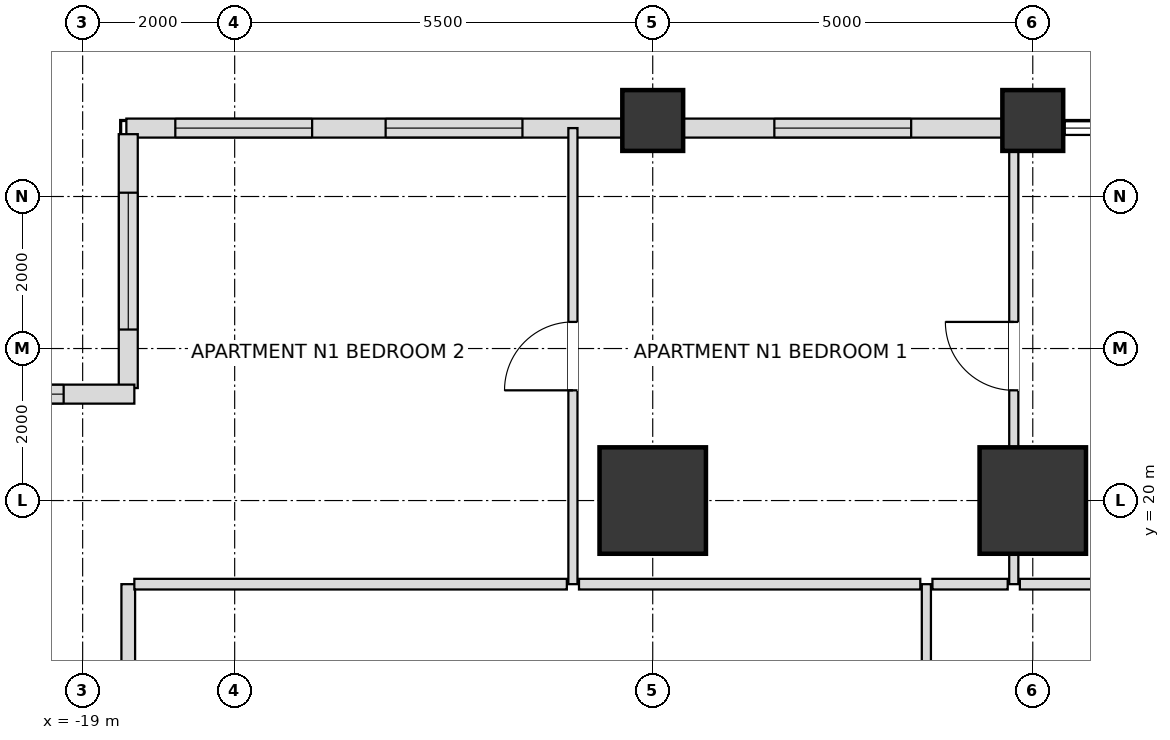
"""IFC4 building model, lengths in metres.
Left out: names, types, materials, properties, quantities, classifications, styles, units other than length and angle.
Written with IfcOpenShell. Run it as: python <this file> out.ifc"""

import sys

from ifc_helpers import new_model, si_unit, direction, frame, frame_2d, origin, origin_2d, place, context, subcontext, project, spatial, rectangle, extrude, element, fill, save


model = new_model("IFC4")
c1 = context("Model", 3, precision=1e-05, world=origin(), true_north=direction((0.0, 1.0)))
c2 = subcontext(c1, "Body", "Model", "MODEL_VIEW")
j1 = project(units=[si_unit("LENGTHUNIT", "METRE"), si_unit("PLANEANGLEUNIT", "RADIAN")], contexts=[c1])
p1 = place(None, origin())
s1 = spatial("IfcSite", under=j1, at=p1, CompositionType="ELEMENT")
p2 = place(p1, origin())
s2 = spatial("IfcBuilding", under=s1, at=p2, CompositionType="ELEMENT")
p3 = place(p2, frame((0.0, 0.0, 32.4)))
s3 = spatial("IfcBuildingStorey", under=s2, at=p3, CompositionType="ELEMENT", Elevation=32.4)
for number, where, z_axis, x_axis in (
    (1, (-6.5, 20.0, 0.0), (0.0, 0.0, 1.0), (1.0, 0.0, 0.0)),
    (2, (-11.5, 20.0, 0.0), (0.0, 0.0, 1.0), (1.0, 0.0, 0.0)),
):
    element("IfcColumn", number, at=place(p3, frame(where, z_axis=z_axis, x_axis=x_axis)), inside=s3, PredefinedType="USERDEFINED", context=c2, shape_type="SweptSolid", body=[
        extrude(rectangle(XDim=1.4, YDim=1.4, at=origin_2d()), origin(), (0.0, 0.0, 1.0), 3.6),
    ])
for number, where, z_axis, x_axis in (
    (3, (-11.5, 25.0, 0.0), (0.0, 0.0, 1.0), (1.0, 0.0, 0.0)),
    (4, (-6.5, 25.0, 0.0), (0.0, 0.0, 1.0), (1.0, 0.0, 0.0)),
):
    element("IfcColumn", number, at=place(p3, frame(where, z_axis=z_axis, x_axis=x_axis)), inside=s3, PredefinedType="COLUMN", context=c2, shape_type="SweptSolid", body=[
        extrude(rectangle(XDim=0.8, YDim=0.8, at=origin_2d()), origin(), (0.0, 0.0, 1.0), 3.6),
    ])
p4 = place(p3, frame((-6.895, 24.9, 0.0), z_axis=(0.0, 0.0, 1.0), x_axis=(-1.0, 0.0, 0.0)))
e5 = element("IfcWall", 5, at=p4, inside=s3, PredefinedType="SOLIDWALL", context=c2, shape_type="SweptSolid", body=[
    extrude(rectangle(XDim=4.21, YDim=0.25, at=frame_2d((2.105, 0.0))), origin(), (0.0, 0.0, 1.0), 2.736),
])
p5 = place(p4, frame((1.205, 0.0, 0.72)))
e6 = element("IfcOpeningElement", 6, at=p5, cuts=e5, PredefinedType="OPENING", context=c2, shape_type="SweptSolid", body=[
    extrude(rectangle(XDim=1.8, YDim=1.68, at=frame_2d((0.9, 0.84))), frame((0.0, 0.135, 0.0), z_axis=(0.0, -1.0, 0.0), x_axis=(1.0, 0.0, 0.0)), (0.0, 0.0, 1.0), 0.27),
])
p6 = place(p3, frame((-11.895, 24.9, 0.0), z_axis=(0.0, 0.0, 1.0), x_axis=(-1.0, 0.0, 0.0)))
e7 = element("IfcWall", 7, at=p6, inside=s3, PredefinedType="SOLIDWALL", context=c2, shape_type="SweptSolid", body=[
    extrude(rectangle(XDim=6.53, YDim=0.25, at=frame_2d((3.265, 0.0))), origin(), (0.0, 0.0, 1.0), 2.736),
])
p7 = place(p6, frame((1.319, 0.0, 0.72)))
e8 = element("IfcOpeningElement", 8, at=p7, cuts=e7, PredefinedType="OPENING", context=c2, shape_type="SweptSolid", body=[
    extrude(rectangle(XDim=1.8, YDim=1.68, at=frame_2d((0.9, 0.84))), frame((0.0, 0.135, 0.0), z_axis=(0.0, -1.0, 0.0), x_axis=(1.0, 0.0, 0.0)), (0.0, 0.0, 1.0), 0.27),
])
p8 = place(p6, frame((4.086, 0.0, 0.72)))
e9 = element("IfcOpeningElement", 9, at=p8, cuts=e7, PredefinedType="OPENING", context=c2, shape_type="SweptSolid", body=[
    extrude(rectangle(XDim=1.8, YDim=1.68, at=frame_2d((0.9, 0.84))), frame((0.0, 0.135, 0.0), z_axis=(0.0, -1.0, 0.0), x_axis=(1.0, 0.0, 0.0)), (0.0, 0.0, 1.0), 0.27),
])
p9 = place(p3, frame((-18.4, 24.82, 0.0), z_axis=(0.0, 0.0, 1.0), x_axis=(0.0, -1.0, 0.0)))
e10 = element("IfcWall", 10, at=p9, inside=s3, PredefinedType="SOLIDWALL", context=c2, shape_type="SweptSolid", body=[
    extrude(rectangle(XDim=3.34, YDim=0.25, at=frame_2d((1.67, 0.0))), origin(), (0.0, 0.0, 1.0), 2.736),
])
p10 = place(p9, frame((0.77, 0.0, 0.72)))
e11 = element("IfcOpeningElement", 11, at=p10, cuts=e10, PredefinedType="OPENING", context=c2, shape_type="SweptSolid", body=[
    extrude(rectangle(XDim=1.8, YDim=1.68, at=frame_2d((0.9, 0.84))), frame((0.0, 0.135, 0.0), z_axis=(0.0, -1.0, 0.0), x_axis=(1.0, 0.0, 0.0)), (0.0, 0.0, 1.0), 0.27),
])
p11 = place(p3, frame((-18.32, 21.4, 0.0), z_axis=(0.0, 0.0, 1.0), x_axis=(-1.0, 0.0, 0.0)))
e12 = element("IfcWall", 12, at=p11, inside=s3, PredefinedType="SOLIDWALL", context=c2, shape_type="SweptSolid", body=[
    extrude(rectangle(XDim=3.66, YDim=0.25, at=frame_2d((1.83, 0.0))), origin(), (0.0, 0.0, 1.0), 2.736),
])
p12 = place(p11, frame((0.93, 0.0, 0.72)))
e13 = element("IfcOpeningElement", 13, at=p12, cuts=e12, PredefinedType="OPENING", context=c2, shape_type="SweptSolid", body=[
    extrude(rectangle(XDim=1.8, YDim=1.68, at=frame_2d((0.9, 0.84))), frame((0.0, 0.135, 0.0), z_axis=(0.0, -1.0, 0.0), x_axis=(1.0, 0.0, 0.0)), (0.0, 0.0, 1.0), 0.27),
])
p13 = place(p3, frame((-18.4, 9.3, 0.0), z_axis=(0.0, 0.0, 1.0), x_axis=(0.0, 1.0, 0.0)))
e14 = element("IfcWall", 14, at=p13, inside=s3, PredefinedType="PARTITIONING", context=c2, shape_type="SweptSolid", body=[
    extrude(rectangle(XDim=9.6, YDim=0.18, at=frame_2d((4.8, 0.0))), origin(), (0.0, 0.0, 1.0), 2.736),
])
p14 = place(p3, frame((-12.55, 18.9, 0.0), z_axis=(0.0, 0.0, 1.0), x_axis=(0.0, 1.0, 0.0)))
e15 = element("IfcWall", 15, at=p14, inside=s3, PredefinedType="PARTITIONING", context=c2, shape_type="SweptSolid", body=[
    extrude(rectangle(XDim=6.0, YDim=0.12, at=frame_2d((3.0, 0.0))), origin(), (0.0, 0.0, 1.0), 2.736),
])
p15 = place(p14, frame((2.55, 0.0, 0.0)))
e16 = element("IfcOpeningElement", 16, at=p15, cuts=e15, PredefinedType="OPENING", context=c2, shape_type="SweptSolid", body=[
    extrude(rectangle(XDim=0.9, YDim=2.1, at=frame_2d((0.45, 1.05))), frame((0.0, 0.07, 0.0), z_axis=(0.0, -1.0, 0.0), x_axis=(1.0, 0.0, 0.0)), (0.0, 0.0, 1.0), 0.14),
])
p16 = place(p3, frame((-7.9, 9.3, 0.0), z_axis=(0.0, 0.0, 1.0), x_axis=(0.0, 1.0, 0.0)))
e17 = element("IfcWall", 17, at=p16, inside=s3, PredefinedType="PARTITIONING", context=c2, shape_type="SweptSolid", body=[
    extrude(rectangle(XDim=9.6, YDim=0.12, at=frame_2d((4.8, 0.0))), origin(), (0.0, 0.0, 1.0), 2.816),
])
p17 = place(p16, frame((4.35, 0.0, 0.0)))
e18 = element("IfcOpeningElement", 18, at=p17, cuts=e17, PredefinedType="OPENING", context=c2, shape_type="SweptSolid", body=[
    extrude(rectangle(XDim=0.9, YDim=2.1, at=frame_2d((0.45, 1.05))), frame((0.0, 0.07, 0.0), z_axis=(0.0, -1.0, 0.0), x_axis=(1.0, 0.0, 0.0)), (0.0, 0.0, 1.0), 0.14),
])
p18 = place(p3, frame((-6.75, 18.9, 0.0), z_axis=(0.0, 0.0, 1.0), x_axis=(0.0, 1.0, 0.0)))
e19 = element("IfcWall", 19, at=p18, inside=s3, PredefinedType="PARTITIONING", context=c2, shape_type="SweptSolid", body=[
    extrude(rectangle(XDim=6.0, YDim=0.12, at=frame_2d((3.0, 0.0))), origin(), (0.0, 0.0, 1.0), 2.816),
])
p19 = place(p18, frame((2.55, 0.0, 0.0)))
e20 = element("IfcOpeningElement", 20, at=p19, cuts=e19, PredefinedType="OPENING", context=c2, shape_type="SweptSolid", body=[
    extrude(rectangle(XDim=0.9, YDim=2.1, at=frame_2d((0.45, 1.05))), frame((0.0, 0.07, 0.0), z_axis=(0.0, -1.0, 0.0), x_axis=(1.0, 0.0, 0.0)), (0.0, 0.0, 1.0), 0.14),
])
p20 = place(p3, frame((-18.32, 18.9, 0.0), z_axis=(0.0, 0.0, 1.0), x_axis=(1.0, 0.0, 0.0)))
e21 = element("IfcWall", 21, at=p20, inside=s3, PredefinedType="PARTITIONING", context=c2, shape_type="SweptSolid", body=[
    extrude(rectangle(XDim=5.69, YDim=0.14, at=frame_2d((2.845, 0.0))), origin(), (0.0, 0.0, 1.0), 2.736),
])
p21 = place(p3, frame((-12.47, 18.9, 0.0), z_axis=(0.0, 0.0, 1.0), x_axis=(1.0, 0.0, 0.0)))
e22 = element("IfcWall", 22, at=p21, inside=s3, PredefinedType="PARTITIONING", context=c2, shape_type="SweptSolid", body=[
    extrude(rectangle(XDim=4.49, YDim=0.14, at=frame_2d((2.245, 0.0))), origin(), (0.0, 0.0, 1.0), 2.736),
])
p22 = place(p3, frame((-7.82, 18.9, 0.0), z_axis=(0.0, 0.0, 1.0), x_axis=(1.0, 0.0, 0.0)))
e23 = element("IfcWall", 23, at=p22, inside=s3, PredefinedType="PARTITIONING", context=c2, shape_type="SweptSolid", body=[
    extrude(rectangle(XDim=0.99, YDim=0.14, at=frame_2d((0.495, 0.0))), origin(), (0.0, 0.0, 1.0), 3.38),
])
p23 = place(p3, frame((-6.67, 18.9, 0.0), z_axis=(0.0, 0.0, 1.0), x_axis=(1.0, 0.0, 0.0)))
e24 = element("IfcWall", 24, at=p23, inside=s3, PredefinedType="PARTITIONING", context=c2, shape_type="SweptSolid", body=[
    extrude(rectangle(XDim=1.89, YDim=0.14, at=frame_2d((0.945, 0.0))), origin(), (0.0, 0.0, 1.0), 2.816),
])
p24 = place(p5, origin())
e25 = element("IfcWindow", 25, at=p24, inside=s3, PartitioningType="SINGLE_PANEL", PredefinedType="WINDOW", context=c2, shape_type="SweptSolid", body=[
    extrude(rectangle(XDim=1.8, YDim=1.68, at=frame_2d((0.9, 0.84))), frame((0.0, 0.03, 0.0), z_axis=(0.0, -1.0, 0.0), x_axis=(1.0, 0.0, 0.0)), (0.0, 0.0, 1.0), 0.06),
])
fill(e6, e25)
p25 = place(p7, origin())
e26 = element("IfcWindow", 26, at=p25, inside=s3, PartitioningType="SINGLE_PANEL", PredefinedType="WINDOW", context=c2, shape_type="SweptSolid", body=[
    extrude(rectangle(XDim=1.8, YDim=1.68, at=frame_2d((0.9, 0.84))), frame((0.0, 0.03, 0.0), z_axis=(0.0, -1.0, 0.0), x_axis=(1.0, 0.0, 0.0)), (0.0, 0.0, 1.0), 0.06),
])
fill(e8, e26)
p26 = place(p8, origin())
e27 = element("IfcWindow", 27, at=p26, inside=s3, PartitioningType="SINGLE_PANEL", PredefinedType="WINDOW", context=c2, shape_type="SweptSolid", body=[
    extrude(rectangle(XDim=1.8, YDim=1.68, at=frame_2d((0.9, 0.84))), frame((0.0, 0.03, 0.0), z_axis=(0.0, -1.0, 0.0), x_axis=(1.0, 0.0, 0.0)), (0.0, 0.0, 1.0), 0.06),
])
fill(e9, e27)
p27 = place(p10, origin())
e28 = element("IfcWindow", 28, at=p27, inside=s3, PartitioningType="SINGLE_PANEL", PredefinedType="WINDOW", context=c2, shape_type="SweptSolid", body=[
    extrude(rectangle(XDim=1.8, YDim=1.68, at=frame_2d((0.9, 0.84))), frame((0.0, 0.03, 0.0), z_axis=(0.0, -1.0, 0.0), x_axis=(1.0, 0.0, 0.0)), (0.0, 0.0, 1.0), 0.06),
])
fill(e11, e28)
p28 = place(p12, origin())
e29 = element("IfcWindow", 29, at=p28, inside=s3, PartitioningType="SINGLE_PANEL", PredefinedType="WINDOW", context=c2, shape_type="SweptSolid", body=[
    extrude(rectangle(XDim=1.8, YDim=1.68, at=frame_2d((0.9, 0.84))), frame((0.0, 0.03, 0.0), z_axis=(0.0, -1.0, 0.0), x_axis=(1.0, 0.0, 0.0)), (0.0, 0.0, 1.0), 0.06),
])
fill(e13, e29)
p29 = place(p19, origin())
e30 = element("IfcDoor", 30, at=p29, inside=s3, OperationType="SINGLE_SWING_RIGHT", PredefinedType="DOOR", context=c2, shape_type="SweptSolid", body=[
    extrude(rectangle(XDim=0.9, YDim=2.1, at=frame_2d((0.45, 1.05))), frame((0.0, 0.025, 0.0), z_axis=(0.0, -1.0, 0.0), x_axis=(1.0, 0.0, 0.0)), (0.0, 0.0, 1.0), 0.05),
])
fill(e20, e30)
p30 = place(p15, origin())
e31 = element("IfcDoor", 31, at=p30, inside=s3, OperationType="SINGLE_SWING_LEFT", PredefinedType="DOOR", context=c2, shape_type="SweptSolid", body=[
    extrude(rectangle(XDim=0.9, YDim=2.1, at=frame_2d((0.45, 1.05))), frame((0.0, 0.025, 0.0), z_axis=(0.0, -1.0, 0.0), x_axis=(1.0, 0.0, 0.0)), (0.0, 0.0, 1.0), 0.05),
])
fill(e16, e31)
save(model, sys.argv[1])
